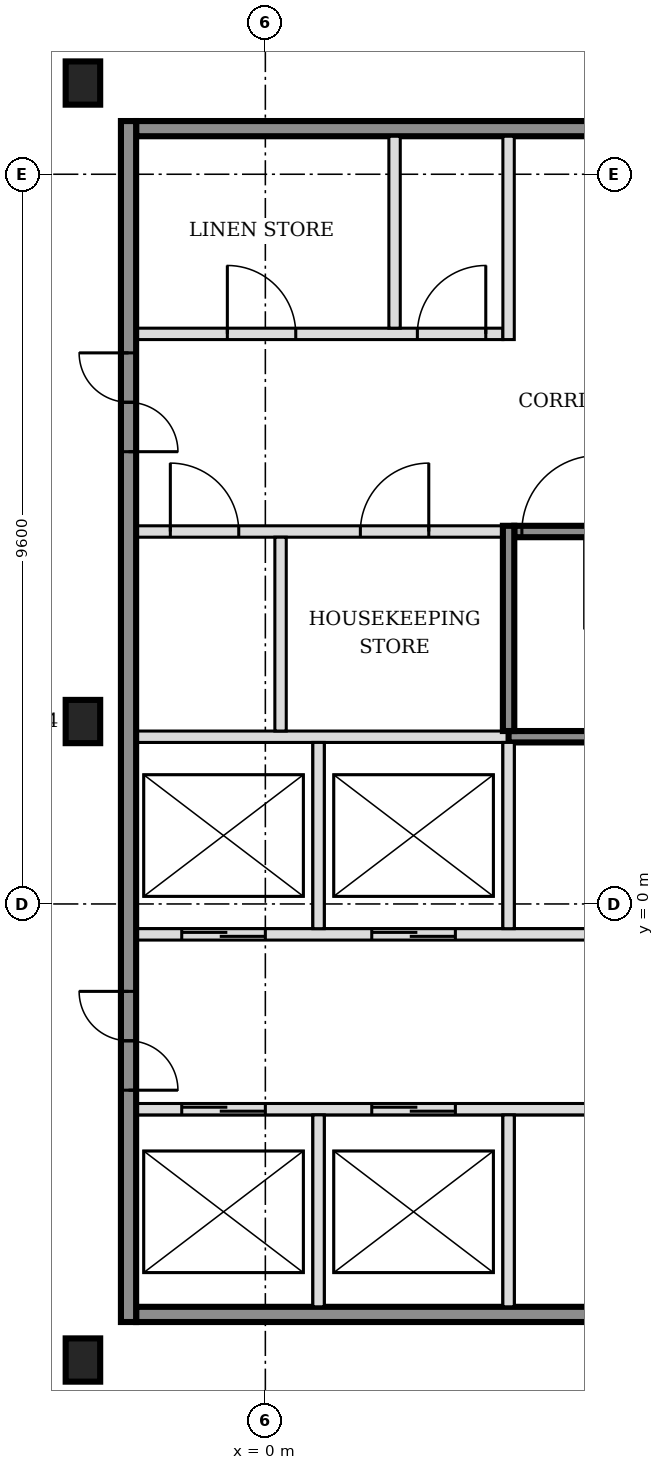
"""IFC4 building model, lengths in metres.
Left out: names, types, materials, properties, quantities, classifications, styles, units other than length and angle.
Written with IfcOpenShell. Run it as: python <this file> out.ifc"""

import sys

from ifc_helpers import new_model, si_unit, direction, frame, frame_2d, origin, origin_2d, place, context, subcontext, project, spatial, rectangle, i_section, extrude, element, fill, save


model = new_model("IFC4")
c1 = context("Model", 3, precision=1e-05, world=origin(), true_north=direction((0.0, 1.0)))
c2 = subcontext(c1, "Body", "Model", "MODEL_VIEW")
j1 = project(units=[si_unit("LENGTHUNIT", "METRE"), si_unit("PLANEANGLEUNIT", "RADIAN")], contexts=[c1])
p1 = place(None, origin())
s1 = spatial("IfcSite", under=j1, at=p1, CompositionType="ELEMENT")
p2 = place(p1, origin())
s2 = spatial("IfcBuilding", under=s1, at=p2, CompositionType="ELEMENT")
p3 = place(p2, frame((0.0, 0.0, 21.0)))
s3 = spatial("IfcBuildingStorey", under=s2, at=p3, CompositionType="ELEMENT", Elevation=21.0)
for number, where, z_axis, x_axis in (
    (1, (-2.4, -6.0, -0.2), (0.0, 0.0, 1.0), (1.0, 0.0, 0.0)),
    (2, (-2.4, 2.4, -0.2), (0.0, 0.0, 1.0), (1.0, 0.0, 0.0)),
    (3, (-2.4, 10.8, -0.2), (0.0, 0.0, 1.0), (1.0, 0.0, 0.0)),
):
    element("IfcColumn", number, at=place(p3, frame(where, z_axis=z_axis, x_axis=x_axis)), inside=s3, PredefinedType="COLUMN", context=c2, shape_type="SweptSolid", body=[
        extrude(i_section(OverallWidth=0.454, OverallDepth=0.569, WebThickness=0.078, FlangeThickness=0.125, FilletRadius=0.015, at=origin_2d()), origin(), (0.0, 0.0, 1.0), 4.8),
    ])
p4 = place(p3, frame((-1.7, -5.4, 0.0), z_axis=(0.0, 0.0, 1.0), x_axis=(1.0, 0.0, 0.0)))
e4 = element("IfcWall", 4, at=p4, inside=s3, PredefinedType="SOLIDWALL", context=c2, shape_type="SweptSolid", body=[
    extrude(rectangle(XDim=7.9, YDim=0.2, at=frame_2d((3.95, 0.0))), origin(), (0.0, 0.0, 1.0), 4.6),
])
p5 = place(p3, frame((-1.7, -2.7, 0.0), z_axis=(0.0, 0.0, 1.0), x_axis=(1.0, 0.0, 0.0)))
e5 = element("IfcWall", 5, at=p5, inside=s3, PredefinedType="SOLIDWALL", context=c2, shape_type="SweptSolid", body=[
    extrude(rectangle(XDim=7.9, YDim=0.15, at=frame_2d((3.95, 0.0))), origin(), (0.0, 0.0, 1.0), 4.6),
])
p6 = place(p5, frame((0.6, 0.0, 0.0)))
e6 = element("IfcOpeningElement", 6, at=p6, cuts=e5, PredefinedType="OPENING", context=c2, shape_type="SweptSolid", body=[
    extrude(rectangle(XDim=1.1, YDim=2.1, at=frame_2d((0.55, 1.05))), frame((0.0, 0.085, 0.0), z_axis=(0.0, -1.0, 0.0), x_axis=(1.0, 0.0, 0.0)), (0.0, 0.0, 1.0), 0.17),
])
p7 = place(p5, frame((3.1, 0.0, 0.0)))
e7 = element("IfcOpeningElement", 7, at=p7, cuts=e5, PredefinedType="OPENING", context=c2, shape_type="SweptSolid", body=[
    extrude(rectangle(XDim=1.1, YDim=2.1, at=frame_2d((0.55, 1.05))), frame((0.0, 0.085, 0.0), z_axis=(0.0, -1.0, 0.0), x_axis=(1.0, 0.0, 0.0)), (0.0, 0.0, 1.0), 0.17),
])
p8 = place(p3, frame((-1.7, -0.4, 0.0), z_axis=(0.0, 0.0, 1.0), x_axis=(1.0, 0.0, 0.0)))
e8 = element("IfcWall", 8, at=p8, inside=s3, PredefinedType="SOLIDWALL", context=c2, shape_type="SweptSolid", body=[
    extrude(rectangle(XDim=15.925, YDim=0.15, at=frame_2d((7.962, 0.0))), origin(), (0.0, 0.0, 1.0), 4.6),
])
p9 = place(p8, frame((0.6, 0.0, 0.0)))
e9 = element("IfcOpeningElement", 9, at=p9, cuts=e8, PredefinedType="OPENING", context=c2, shape_type="SweptSolid", body=[
    extrude(rectangle(XDim=1.1, YDim=2.1, at=frame_2d((0.55, 1.05))), frame((0.0, 0.085, 0.0), z_axis=(0.0, -1.0, 0.0), x_axis=(1.0, 0.0, 0.0)), (0.0, 0.0, 1.0), 0.17),
])
p10 = place(p8, frame((3.1, 0.0, 0.0)))
e10 = element("IfcOpeningElement", 10, at=p10, cuts=e8, PredefinedType="OPENING", context=c2, shape_type="SweptSolid", body=[
    extrude(rectangle(XDim=1.1, YDim=2.1, at=frame_2d((0.55, 1.05))), frame((0.0, 0.085, 0.0), z_axis=(0.0, -1.0, 0.0), x_axis=(1.0, 0.0, 0.0)), (0.0, 0.0, 1.0), 0.17),
])
p11 = place(p8, frame((11.575, 0.0, 0.0)))
e11 = element("IfcOpeningElement", 11, at=p11, cuts=e8, PredefinedType="OPENING", context=c2, shape_type="SweptSolid", body=[
    extrude(rectangle(XDim=1.2, YDim=2.1, at=frame_2d((0.6, 1.05))), frame((0.0, 0.085, 0.0), z_axis=(0.0, -1.0, 0.0), x_axis=(1.0, 0.0, 0.0)), (0.0, 0.0, 1.0), 0.17),
])
p12 = place(p8, frame((14.125, 0.0, 0.0)))
e12 = element("IfcOpeningElement", 12, at=p12, cuts=e8, PredefinedType="OPENING", context=c2, shape_type="SweptSolid", body=[
    extrude(rectangle(XDim=1.2, YDim=2.1, at=frame_2d((0.6, 1.05))), frame((0.0, 0.085, 0.0), z_axis=(0.0, -1.0, 0.0), x_axis=(1.0, 0.0, 0.0)), (0.0, 0.0, 1.0), 0.17),
])
p13 = place(p3, frame((-1.7, 2.2, 0.0), z_axis=(0.0, 0.0, 1.0), x_axis=(1.0, 0.0, 0.0)))
e13 = element("IfcWall", 13, at=p13, inside=s3, PredefinedType="SOLIDWALL", context=c2, shape_type="SweptSolid", body=[
    extrude(rectangle(XDim=4.9, YDim=0.15, at=frame_2d((2.45, 0.0))), origin(), (0.0, 0.0, 1.0), 4.6),
])
p14 = place(p3, frame((3.2, 2.2, 0.0), z_axis=(0.0, 0.0, 1.0), x_axis=(1.0, 0.0, 0.0)))
e14 = element("IfcWall", 14, at=p14, inside=s3, PredefinedType="SOLIDWALL", context=c2, shape_type="SweptSolid", body=[
    extrude(rectangle(XDim=6.5, YDim=0.15, at=frame_2d((3.25, 0.0))), origin(), (0.0, 0.0, 1.0), 4.6),
])
p15 = place(p3, frame((-1.7, 4.9, 0.0), z_axis=(0.0, 0.0, 1.0), x_axis=(1.0, 0.0, 0.0)))
e15 = element("IfcWall", 15, at=p15, inside=s3, PredefinedType="PARTITIONING", context=c2, shape_type="SweptSolid", body=[
    extrude(rectangle(XDim=4.825, YDim=0.15, at=frame_2d((2.413, 0.0))), origin(), (0.0, 0.0, 1.0), 4.6),
])
p16 = place(p15, frame((0.45, 0.0, 0.0)))
e16 = element("IfcOpeningElement", 16, at=p16, cuts=e15, PredefinedType="OPENING", context=c2, shape_type="SweptSolid", body=[
    extrude(rectangle(XDim=0.9, YDim=2.1, at=frame_2d((0.45, 1.05))), frame((0.0, 0.085, 0.0), z_axis=(0.0, -1.0, 0.0), x_axis=(1.0, 0.0, 0.0)), (0.0, 0.0, 1.0), 0.17),
])
p17 = place(p15, frame((2.95, 0.0, 0.0)))
e17 = element("IfcOpeningElement", 17, at=p17, cuts=e15, PredefinedType="OPENING", context=c2, shape_type="SweptSolid", body=[
    extrude(rectangle(XDim=0.9, YDim=2.1, at=frame_2d((0.45, 1.05))), frame((0.0, 0.085, 0.0), z_axis=(0.0, -1.0, 0.0), x_axis=(1.0, 0.0, 0.0)), (0.0, 0.0, 1.0), 0.17),
])
p18 = place(p3, frame((3.275, 4.9, 0.0), z_axis=(0.0, 0.0, 1.0), x_axis=(1.0, 0.0, 0.0)))
e18 = element("IfcWall", 18, at=p18, inside=s3, PredefinedType="SOLIDWALL", context=c2, shape_type="SweptSolid", body=[
    extrude(rectangle(XDim=6.425, YDim=0.15, at=frame_2d((3.212, 0.0))), origin(), (0.0, 0.0, 1.0), 4.6),
])
p19 = place(p18, frame((0.1, 0.0, 0.0)))
e19 = element("IfcOpeningElement", 19, at=p19, cuts=e18, PredefinedType="OPENING", context=c2, shape_type="SweptSolid", body=[
    extrude(rectangle(XDim=1.0, YDim=2.1, at=frame_2d((0.5, 1.05))), frame((0.0, 0.085, 0.0), z_axis=(0.0, -1.0, 0.0), x_axis=(1.0, 0.0, 0.0)), (0.0, 0.0, 1.0), 0.17),
])
p20 = place(p3, frame((-1.7, 7.5, 0.0), z_axis=(0.0, 0.0, 1.0), x_axis=(1.0, 0.0, 0.0)))
e20 = element("IfcWall", 20, at=p20, inside=s3, PredefinedType="PARTITIONING", context=c2, shape_type="SweptSolid", body=[
    extrude(rectangle(XDim=4.825, YDim=0.15, at=frame_2d((2.413, 0.0))), origin(), (0.0, 0.0, 1.0), 4.6),
])
p21 = place(p20, frame((1.2, 0.0, 0.0)))
e21 = element("IfcOpeningElement", 21, at=p21, cuts=e20, PredefinedType="OPENING", context=c2, shape_type="SweptSolid", body=[
    extrude(rectangle(XDim=0.9, YDim=2.1, at=frame_2d((0.45, 1.05))), frame((0.0, 0.085, 0.0), z_axis=(0.0, -1.0, 0.0), x_axis=(1.0, 0.0, 0.0)), (0.0, 0.0, 1.0), 0.17),
])
p22 = place(p20, frame((3.7, 0.0, 0.0)))
e22 = element("IfcOpeningElement", 22, at=p22, cuts=e20, PredefinedType="OPENING", context=c2, shape_type="SweptSolid", body=[
    extrude(rectangle(XDim=0.9, YDim=2.1, at=frame_2d((0.45, 1.05))), frame((0.0, 0.085, 0.0), z_axis=(0.0, -1.0, 0.0), x_axis=(1.0, 0.0, 0.0)), (0.0, 0.0, 1.0), 0.17),
])
p23 = place(p3, frame((-1.7, 10.2, 0.0), z_axis=(0.0, 0.0, 1.0), x_axis=(1.0, 0.0, 0.0)))
e23 = element("IfcWall", 23, at=p23, inside=s3, PredefinedType="SOLIDWALL", context=c2, shape_type="SweptSolid", body=[
    extrude(rectangle(XDim=7.9, YDim=0.2, at=frame_2d((3.95, 0.0))), origin(), (0.0, 0.0, 1.0), 4.6),
])
p24 = place(p3, frame((-1.8, -5.5, 0.0), z_axis=(0.0, 0.0, 1.0), x_axis=(0.0, 1.0, 0.0)))
e24 = element("IfcWall", 24, at=p24, inside=s3, PredefinedType="SOLIDWALL", context=c2, shape_type="SweptSolid", body=[
    extrude(rectangle(XDim=15.8, YDim=0.2, at=frame_2d((7.9, 0.0))), origin(), (0.0, 0.0, 1.0), 4.6),
])
p25 = place(p24, frame((3.05, 0.0, 0.0)))
e25 = element("IfcOpeningElement", 25, at=p25, cuts=e24, PredefinedType="OPENING", context=c2, shape_type="SweptSolid", body=[
    extrude(rectangle(XDim=1.3, YDim=2.1, at=frame_2d((0.65, 1.05))), frame((0.0, 0.11, 0.0), z_axis=(0.0, -1.0, 0.0), x_axis=(1.0, 0.0, 0.0)), (0.0, 0.0, 1.0), 0.22),
])
p26 = place(p24, frame((11.45, 0.0, 0.0)))
e26 = element("IfcOpeningElement", 26, at=p26, cuts=e24, PredefinedType="OPENING", context=c2, shape_type="SweptSolid", body=[
    extrude(rectangle(XDim=1.3, YDim=2.1, at=frame_2d((0.65, 1.05))), frame((0.0, 0.11, 0.0), z_axis=(0.0, -1.0, 0.0), x_axis=(1.0, 0.0, 0.0)), (0.0, 0.0, 1.0), 0.22),
])
p27 = place(p3, frame((0.2, 2.275, 0.0), z_axis=(0.0, 0.0, 1.0), x_axis=(0.0, 1.0, 0.0)))
e27 = element("IfcWall", 27, at=p27, inside=s3, PredefinedType="PARTITIONING", context=c2, shape_type="SweptSolid", body=[
    extrude(rectangle(XDim=2.55, YDim=0.15, at=frame_2d((1.275, 0.0))), origin(), (0.0, 0.0, 1.0), 4.6),
])
p28 = place(p3, frame((0.7, -5.3, 0.0), z_axis=(0.0, 0.0, 1.0), x_axis=(0.0, 1.0, 0.0)))
e28 = element("IfcWall", 28, at=p28, inside=s3, PredefinedType="SOLIDWALL", context=c2, shape_type="SweptSolid", body=[
    extrude(rectangle(XDim=2.525, YDim=0.15, at=frame_2d((1.263, 0.0))), origin(), (0.0, 0.0, 1.0), 4.6),
])
p29 = place(p3, frame((0.7, -0.325, 0.0), z_axis=(0.0, 0.0, 1.0), x_axis=(0.0, 1.0, 0.0)))
e29 = element("IfcWall", 29, at=p29, inside=s3, PredefinedType="SOLIDWALL", context=c2, shape_type="SweptSolid", body=[
    extrude(rectangle(XDim=2.45, YDim=0.15, at=frame_2d((1.225, 0.0))), origin(), (0.0, 0.0, 1.0), 4.6),
])
p30 = place(p3, frame((1.7, 7.575, 0.0), z_axis=(0.0, 0.0, 1.0), x_axis=(0.0, 1.0, 0.0)))
e30 = element("IfcWall", 30, at=p30, inside=s3, PredefinedType="PARTITIONING", context=c2, shape_type="SweptSolid", body=[
    extrude(rectangle(XDim=2.525, YDim=0.15, at=frame_2d((1.263, 0.0))), origin(), (0.0, 0.0, 1.0), 4.6),
])
p31 = place(p3, frame((3.2, -5.3, 0.0), z_axis=(0.0, 0.0, 1.0), x_axis=(0.0, 1.0, 0.0)))
e31 = element("IfcWall", 31, at=p31, inside=s3, PredefinedType="SOLIDWALL", context=c2, shape_type="SweptSolid", body=[
    extrude(rectangle(XDim=2.525, YDim=0.15, at=frame_2d((1.263, 0.0))), origin(), (0.0, 0.0, 1.0), 4.6),
])
p32 = place(p3, frame((3.2, -0.325, 0.0), z_axis=(0.0, 0.0, 1.0), x_axis=(0.0, 1.0, 0.0)))
e32 = element("IfcWall", 32, at=p32, inside=s3, PredefinedType="SOLIDWALL", context=c2, shape_type="SweptSolid", body=[
    extrude(rectangle(XDim=2.45, YDim=0.15, at=frame_2d((1.225, 0.0))), origin(), (0.0, 0.0, 1.0), 4.6),
])
p33 = place(p3, frame((3.2, 2.275, 0.0), z_axis=(0.0, 0.0, 1.0), x_axis=(0.0, 1.0, 0.0)))
e33 = element("IfcWall", 33, at=p33, inside=s3, PredefinedType="SOLIDWALL", context=c2, shape_type="SweptSolid", body=[
    extrude(rectangle(XDim=2.7, YDim=0.15, at=frame_2d((1.35, 0.0))), origin(), (0.0, 0.0, 1.0), 4.6),
])
p34 = place(p3, frame((3.2, 7.425, 0.0), z_axis=(0.0, 0.0, 1.0), x_axis=(0.0, 1.0, 0.0)))
e34 = element("IfcWall", 34, at=p34, inside=s3, PredefinedType="PARTITIONING", context=c2, shape_type="SweptSolid", body=[
    extrude(rectangle(XDim=2.675, YDim=0.15, at=frame_2d((1.337, 0.0))), origin(), (0.0, 0.0, 1.0), 4.6),
])
p35 = place(p6, origin())
e35 = element("IfcDoor", 35, at=p35, inside=s3, OperationType="DOUBLE_DOOR_SLIDING", PredefinedType="DOOR", context=c2, shape_type="SweptSolid", body=[
    extrude(rectangle(XDim=1.1, YDim=2.1, at=frame_2d((0.55, 1.05))), frame((0.0, 0.025, 0.0), z_axis=(0.0, -1.0, 0.0), x_axis=(1.0, 0.0, 0.0)), (0.0, 0.0, 1.0), 0.05),
])
fill(e6, e35)
p36 = place(p7, origin())
e36 = element("IfcDoor", 36, at=p36, inside=s3, OperationType="DOUBLE_DOOR_SLIDING", PredefinedType="DOOR", context=c2, shape_type="SweptSolid", body=[
    extrude(rectangle(XDim=1.1, YDim=2.1, at=frame_2d((0.55, 1.05))), frame((0.0, 0.025, 0.0), z_axis=(0.0, -1.0, 0.0), x_axis=(1.0, 0.0, 0.0)), (0.0, 0.0, 1.0), 0.05),
])
fill(e7, e36)
p37 = place(p9, origin())
e37 = element("IfcDoor", 37, at=p37, inside=s3, OperationType="DOUBLE_DOOR_SLIDING", PredefinedType="DOOR", context=c2, shape_type="SweptSolid", body=[
    extrude(rectangle(XDim=1.1, YDim=2.1, at=frame_2d((0.55, 1.05))), frame((0.0, 0.025, 0.0), z_axis=(0.0, -1.0, 0.0), x_axis=(1.0, 0.0, 0.0)), (0.0, 0.0, 1.0), 0.05),
])
fill(e9, e37)
p38 = place(p10, origin())
e38 = element("IfcDoor", 38, at=p38, inside=s3, OperationType="DOUBLE_DOOR_SLIDING", PredefinedType="DOOR", context=c2, shape_type="SweptSolid", body=[
    extrude(rectangle(XDim=1.1, YDim=2.1, at=frame_2d((0.55, 1.05))), frame((0.0, 0.025, 0.0), z_axis=(0.0, -1.0, 0.0), x_axis=(1.0, 0.0, 0.0)), (0.0, 0.0, 1.0), 0.05),
])
fill(e10, e38)
p39 = place(p19, origin())
e39 = element("IfcDoor", 39, at=p39, inside=s3, OperationType="SINGLE_SWING_RIGHT", PredefinedType="DOOR", context=c2, shape_type="SweptSolid", body=[
    extrude(rectangle(XDim=1.0, YDim=2.1, at=frame_2d((0.5, 1.05))), frame((0.0, 0.025, 0.0), z_axis=(0.0, -1.0, 0.0), x_axis=(1.0, 0.0, 0.0)), (0.0, 0.0, 1.0), 0.05),
])
fill(e19, e39)
p40 = place(p25, origin())
e40 = element("IfcDoor", 40, at=p40, inside=s3, OperationType="DOUBLE_DOOR_SINGLE_SWING", PredefinedType="DOOR", context=c2, shape_type="SweptSolid", body=[
    extrude(rectangle(XDim=1.3, YDim=2.1, at=frame_2d((0.65, 1.05))), frame((0.0, 0.025, 0.0), z_axis=(0.0, -1.0, 0.0), x_axis=(1.0, 0.0, 0.0)), (0.0, 0.0, 1.0), 0.05),
])
fill(e25, e40)
p41 = place(p26, origin())
e41 = element("IfcDoor", 41, at=p41, inside=s3, OperationType="DOUBLE_DOOR_SINGLE_SWING", PredefinedType="DOOR", context=c2, shape_type="SweptSolid", body=[
    extrude(rectangle(XDim=1.3, YDim=2.1, at=frame_2d((0.65, 1.05))), frame((0.0, 0.025, 0.0), z_axis=(0.0, -1.0, 0.0), x_axis=(1.0, 0.0, 0.0)), (0.0, 0.0, 1.0), 0.05),
])
fill(e26, e41)
p42 = place(p16, origin())
e42 = element("IfcDoor", 42, at=p42, inside=s3, OperationType="SINGLE_SWING_LEFT", PredefinedType="DOOR", context=c2, shape_type="SweptSolid", body=[
    extrude(rectangle(XDim=0.9, YDim=2.1, at=frame_2d((0.45, 1.05))), frame((0.0, 0.025, 0.0), z_axis=(0.0, -1.0, 0.0), x_axis=(1.0, 0.0, 0.0)), (0.0, 0.0, 1.0), 0.05),
])
fill(e16, e42)
p43 = place(p17, origin())
e43 = element("IfcDoor", 43, at=p43, inside=s3, OperationType="SINGLE_SWING_RIGHT", PredefinedType="DOOR", context=c2, shape_type="SweptSolid", body=[
    extrude(rectangle(XDim=0.9, YDim=2.1, at=frame_2d((0.45, 1.05))), frame((0.0, 0.025, 0.0), z_axis=(0.0, -1.0, 0.0), x_axis=(1.0, 0.0, 0.0)), (0.0, 0.0, 1.0), 0.05),
])
fill(e17, e43)
p44 = place(p21, origin())
e44 = element("IfcDoor", 44, at=p44, inside=s3, OperationType="SINGLE_SWING_LEFT", PredefinedType="DOOR", context=c2, shape_type="SweptSolid", body=[
    extrude(rectangle(XDim=0.9, YDim=2.1, at=frame_2d((0.45, 1.05))), frame((0.0, 0.025, 0.0), z_axis=(0.0, -1.0, 0.0), x_axis=(1.0, 0.0, 0.0)), (0.0, 0.0, 1.0), 0.05),
])
fill(e21, e44)
p45 = place(p22, origin())
e45 = element("IfcDoor", 45, at=p45, inside=s3, OperationType="SINGLE_SWING_RIGHT", PredefinedType="DOOR", context=c2, shape_type="SweptSolid", body=[
    extrude(rectangle(XDim=0.9, YDim=2.1, at=frame_2d((0.45, 1.05))), frame((0.0, 0.025, 0.0), z_axis=(0.0, -1.0, 0.0), x_axis=(1.0, 0.0, 0.0)), (0.0, 0.0, 1.0), 0.05),
])
fill(e22, e45)
save(model, sys.argv[1])
